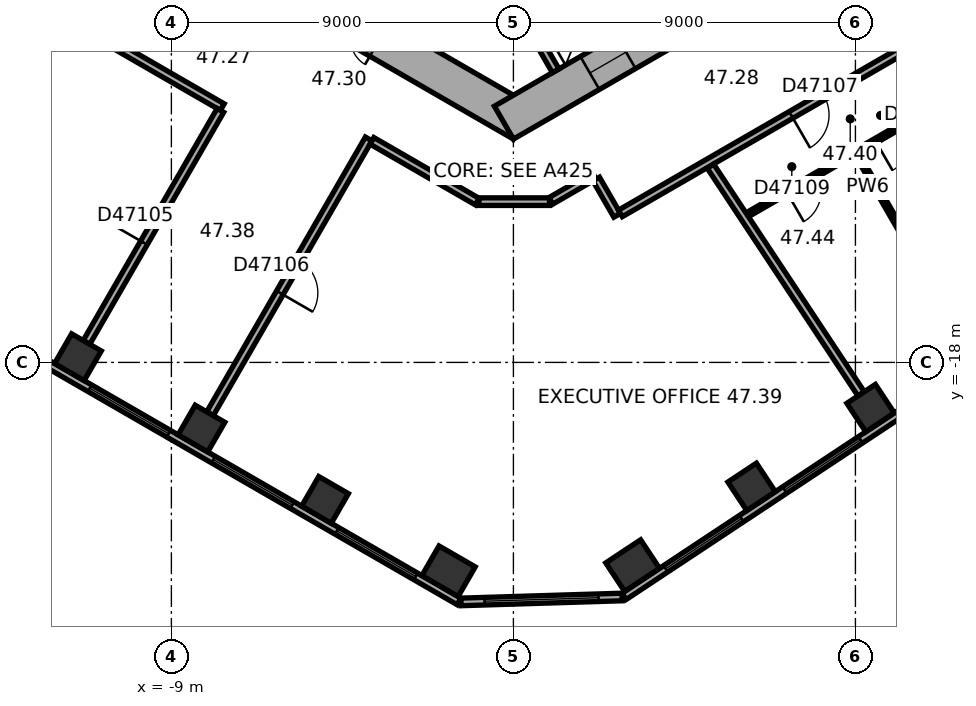
"""IFC4 building model, lengths in metres.
Left out: names, types, materials, properties, quantities, classifications, styles, units other than length and angle.
Written with IfcOpenShell. Run it as: python <this file> out.ifc"""

import sys

from ifc_helpers import new_model, si_unit, direction, frame, frame_2d, origin, origin_2d, place, context, subcontext, project, spatial, rectangle, extrude, element, fill, save


model = new_model("IFC4")
c1 = context("Model", 3, precision=1e-05, world=origin(), true_north=direction((0.0, 1.0)))
c2 = subcontext(c1, "Body", "Model", "MODEL_VIEW")
j1 = project(units=[si_unit("LENGTHUNIT", "METRE"), si_unit("PLANEANGLEUNIT", "RADIAN")], contexts=[c1])
p1 = place(None, origin())
s1 = spatial("IfcSite", under=j1, at=p1, CompositionType="ELEMENT")
p2 = place(p1, origin())
s2 = spatial("IfcBuilding", under=s1, at=p2, CompositionType="ELEMENT")
p3 = place(p2, frame((0.0, 0.0, 191.0)))
s3 = spatial("IfcBuildingStorey", under=s2, at=p3, CompositionType="ELEMENT", Elevation=191.0)
for number, where, z_axis, x_axis in (
    (1, (-11.46, -17.863, 0.0), (0.0, 0.0, 1.0), (0.866, -0.5, 0.0)),
    (2, (-8.208, -19.74, 0.0), (0.0, 0.0, 1.0), (0.866, -0.5, 0.0)),
    (3, (-4.958, -21.617, 0.0), (0.0, 0.0, 1.0), (0.866, -0.5, 0.0)),
):
    element("IfcColumn", number, at=place(p3, frame(where, z_axis=z_axis, x_axis=x_axis)), inside=s3, PredefinedType="COLUMN", context=c2, shape_type="SweptSolid", body=[
        extrude(rectangle(XDim=0.9, YDim=0.9, at=origin_2d()), origin(), (0.0, 0.0, 1.0), 3.7),
    ])
for number, where, z_axis, x_axis in (
    (4, (-1.706, -23.494, 0.0), (0.0, 0.0, 1.0), (0.866, -0.5, 0.0)),
    (5, (3.137, -23.346, 0.0), (0.0, 0.0, 1.0), (0.834, 0.552, 0.0)),
):
    element("IfcColumn", number, at=place(p3, frame(where, z_axis=z_axis, x_axis=x_axis)), inside=s3, PredefinedType="COLUMN", context=c2, shape_type="SweptSolid", body=[
        extrude(rectangle(XDim=1.1, YDim=0.9, at=origin_2d()), origin(), (0.0, 0.0, 1.0), 3.7),
    ])
for number, where, z_axis, x_axis in (
    (6, (6.268, -21.274, 0.0), (0.0, 0.0, 1.0), (0.834, 0.552, 0.0)),
    (7, (9.398, -19.202, 0.0), (0.0, 0.0, 1.0), (0.834, 0.552, 0.0)),
):
    element("IfcColumn", number, at=place(p3, frame(where, z_axis=z_axis, x_axis=x_axis)), inside=s3, PredefinedType="COLUMN", context=c2, shape_type="SweptSolid", body=[
        extrude(rectangle(XDim=0.9, YDim=0.9, at=origin_2d()), origin(), (0.0, 0.0, 1.0), 3.7),
    ])
p4 = place(p3, frame((-10.25, -5.629, 0.0), z_axis=(0.0, 0.0, 1.0), x_axis=(0.866022616891, -0.50000482701, 0.0)))
e8 = element("IfcWall", 8, at=p4, inside=s3, PredefinedType="SHEAR", context=c2, shape_type="SweptSolid", body=[
    extrude(rectangle(XDim=12.125, YDim=1.0, at=frame_2d((6.062, 0.0))), origin(), (0.0, 0.0, 1.0), 3.7),
])
p5 = place(p4, frame((6.262, 0.0, 0.0)))
e9 = element("IfcOpeningElement", 9, at=p5, cuts=e8, PredefinedType="OPENING", context=c2, shape_type="SweptSolid", body=[
    extrude(rectangle(XDim=1.5, YDim=2.1, at=frame_2d((0.75, 1.05))), frame((0.0, 0.51, 0.0), z_axis=(0.0, -1.0, 0.0), x_axis=(1.0, 0.0, 0.0)), (0.0, 0.0, 1.0), 1.02),
])
p6 = place(p4, frame((1.712, 0.0, 0.0)))
e10 = element("IfcOpeningElement", 10, at=p6, cuts=e8, PredefinedType="OPENING", context=c2, shape_type="SweptSolid", body=[
    extrude(rectangle(XDim=1.1, YDim=2.1, at=frame_2d((0.55, 1.05))), frame((0.0, 0.51, 0.0), z_axis=(0.0, -1.0, 0.0), x_axis=(1.0, 0.0, 0.0)), (0.0, 0.0, 1.0), 1.02),
])
p7 = place(p4, frame((4.312, 0.0, 0.0)))
e11 = element("IfcOpeningElement", 11, at=p7, cuts=e8, PredefinedType="OPENING", context=c2, shape_type="SweptSolid", body=[
    extrude(rectangle(XDim=1.1, YDim=2.1, at=frame_2d((0.55, 1.05))), frame((0.0, 0.51, 0.0), z_axis=(0.0, -1.0, 0.0), x_axis=(1.0, 0.0, 0.0)), (0.0, 0.0, 1.0), 1.02),
])
p8 = place(p3, frame((-0.25, -11.691, 0.0), z_axis=(0.0, 0.0, 1.0), x_axis=(0.866022616891, 0.50000482701, 0.0)))
e12 = element("IfcWall", 12, at=p8, inside=s3, PredefinedType="SHEAR", context=c2, shape_type="SweptSolid", body=[
    extrude(rectangle(XDim=12.125, YDim=1.0, at=frame_2d((6.062, 0.0))), origin(), (0.0, 0.0, 1.0), 3.7),
])
p9 = place(p8, frame((2.612, 0.0, 0.0)))
e13 = element("IfcOpeningElement", 13, at=p9, cuts=e12, PredefinedType="OPENING", context=c2, shape_type="SweptSolid", body=[
    extrude(rectangle(XDim=1.1, YDim=2.1, at=frame_2d((0.55, 1.05))), frame((0.0, 0.51, 0.0), z_axis=(0.0, -1.0, 0.0), x_axis=(1.0, 0.0, 0.0)), (0.0, 0.0, 1.0), 1.02),
])
p10 = place(p8, frame((5.212, 0.0, 0.0)))
e14 = element("IfcOpeningElement", 14, at=p10, cuts=e12, PredefinedType="OPENING", context=c2, shape_type="SweptSolid", body=[
    extrude(rectangle(XDim=1.1, YDim=2.1, at=frame_2d((0.55, 1.05))), frame((0.0, 0.51, 0.0), z_axis=(0.0, -1.0, 0.0), x_axis=(1.0, 0.0, 0.0)), (0.0, 0.0, 1.0), 1.02),
])
p11 = place(p8, frame((7.812, 0.0, 0.0)))
e15 = element("IfcOpeningElement", 15, at=p11, cuts=e12, PredefinedType="OPENING", context=c2, shape_type="SweptSolid", body=[
    extrude(rectangle(XDim=1.1, YDim=2.1, at=frame_2d((0.55, 1.05))), frame((0.0, 0.51, 0.0), z_axis=(0.0, -1.0, 0.0), x_axis=(1.0, 0.0, 0.0)), (0.0, 0.0, 1.0), 1.02),
])
p12 = place(p3, frame((-18.789, -14.267, 0.0), z_axis=(0.0, 0.0, 1.0), x_axis=(0.866023315909, -0.500003616288, 0.0)))
e16 = element("IfcWall", 16, at=p12, inside=s3, PredefinedType="STANDARD", context=c2, shape_type="SweptSolid", body=[
    extrude(rectangle(XDim=20.044, YDim=0.2, at=frame_2d((10.022, 0.0))), origin(), (0.0, 0.0, 1.0), 3.7),
])
p13 = place(p12, frame((1.314, 0.0, 0.9)))
e17 = element("IfcOpeningElement", 17, at=p13, cuts=e16, PredefinedType="OPENING", context=c2, shape_type="SweptSolid", body=[
    extrude(rectangle(XDim=2.4, YDim=2.0, at=frame_2d((1.2, 1.0))), frame((0.0, 0.11, 0.0), z_axis=(0.0, -1.0, 0.0), x_axis=(1.0, 0.0, 0.0)), (0.0, 0.0, 1.0), 0.22),
])
p14 = place(p12, frame((5.069, 0.0, 0.9)))
e18 = element("IfcOpeningElement", 18, at=p14, cuts=e16, PredefinedType="OPENING", context=c2, shape_type="SweptSolid", body=[
    extrude(rectangle(XDim=2.4, YDim=2.0, at=frame_2d((1.2, 1.0))), frame((0.0, 0.11, 0.0), z_axis=(0.0, -1.0, 0.0), x_axis=(1.0, 0.0, 0.0)), (0.0, 0.0, 1.0), 0.22),
])
p15 = place(p12, frame((8.823, 0.0, 0.9)))
e19 = element("IfcOpeningElement", 19, at=p15, cuts=e16, PredefinedType="OPENING", context=c2, shape_type="SweptSolid", body=[
    extrude(rectangle(XDim=2.4, YDim=2.0, at=frame_2d((1.2, 1.0))), frame((0.0, 0.11, 0.0), z_axis=(0.0, -1.0, 0.0), x_axis=(1.0, 0.0, 0.0)), (0.0, 0.0, 1.0), 0.22),
])
p16 = place(p12, frame((12.577, 0.0, 0.9)))
e20 = element("IfcOpeningElement", 20, at=p16, cuts=e16, PredefinedType="OPENING", context=c2, shape_type="SweptSolid", body=[
    extrude(rectangle(XDim=2.4, YDim=2.0, at=frame_2d((1.2, 1.0))), frame((0.0, 0.11, 0.0), z_axis=(0.0, -1.0, 0.0), x_axis=(1.0, 0.0, 0.0)), (0.0, 0.0, 1.0), 0.22),
])
p17 = place(p12, frame((16.331, 0.0, 0.9)))
e21 = element("IfcOpeningElement", 21, at=p17, cuts=e16, PredefinedType="OPENING", context=c2, shape_type="SweptSolid", body=[
    extrude(rectangle(XDim=2.4, YDim=2.0, at=frame_2d((1.2, 1.0))), frame((0.0, 0.11, 0.0), z_axis=(0.0, -1.0, 0.0), x_axis=(1.0, 0.0, 0.0)), (0.0, 0.0, 1.0), 0.22),
])
p18 = place(p3, frame((-1.378, -24.302, 0.0), z_axis=(0.0, 0.0, 1.0), x_axis=(0.999533857267, 0.030529791629, 0.0)))
e22 = element("IfcWall", 22, at=p18, inside=s3, PredefinedType="STANDARD", context=c2, shape_type="SweptSolid", body=[
    extrude(rectangle(XDim=4.238, YDim=0.2, at=frame_2d((2.119, 0.0))), origin(), (0.0, 0.0, 1.0), 3.7),
])
p19 = place(p18, frame((0.619, 0.0, 0.9)))
e23 = element("IfcOpeningElement", 23, at=p19, cuts=e22, PredefinedType="OPENING", context=c2, shape_type="SweptSolid", body=[
    extrude(rectangle(XDim=3.0, YDim=2.0, at=frame_2d((1.5, 1.0))), frame((0.0, 0.11, 0.0), z_axis=(0.0, -1.0, 0.0), x_axis=(1.0, 0.0, 0.0)), (0.0, 0.0, 1.0), 0.22),
])
p20 = place(p3, frame((2.911, -24.156, 0.0), z_axis=(0.0, 0.0, 1.0), x_axis=(0.833882163564, 0.551942512668, 0.0)))
e24 = element("IfcWall", 24, at=p20, inside=s3, PredefinedType="STANDARD", context=c2, shape_type="SweptSolid", body=[
    extrude(rectangle(XDim=20.044, YDim=0.2, at=frame_2d((10.022, 0.0))), origin(), (0.0, 0.0, 1.0), 3.7),
])
p21 = place(p20, frame((1.313, 0.0, 0.9)))
e25 = element("IfcOpeningElement", 25, at=p21, cuts=e24, PredefinedType="OPENING", context=c2, shape_type="SweptSolid", body=[
    extrude(rectangle(XDim=2.4, YDim=2.0, at=frame_2d((1.2, 1.0))), frame((0.0, 0.11, 0.0), z_axis=(0.0, -1.0, 0.0), x_axis=(1.0, 0.0, 0.0)), (0.0, 0.0, 1.0), 0.22),
])
p22 = place(p20, frame((5.067, 0.0, 0.9)))
e26 = element("IfcOpeningElement", 26, at=p22, cuts=e24, PredefinedType="OPENING", context=c2, shape_type="SweptSolid", body=[
    extrude(rectangle(XDim=2.4, YDim=2.0, at=frame_2d((1.2, 1.0))), frame((0.0, 0.11, 0.0), z_axis=(0.0, -1.0, 0.0), x_axis=(1.0, 0.0, 0.0)), (0.0, 0.0, 1.0), 0.22),
])
p23 = place(p20, frame((8.821, 0.0, 0.9)))
e27 = element("IfcOpeningElement", 27, at=p23, cuts=e24, PredefinedType="OPENING", context=c2, shape_type="SweptSolid", body=[
    extrude(rectangle(XDim=2.4, YDim=2.0, at=frame_2d((1.2, 1.0))), frame((0.0, 0.11, 0.0), z_axis=(0.0, -1.0, 0.0), x_axis=(1.0, 0.0, 0.0)), (0.0, 0.0, 1.0), 0.22),
])
p24 = place(p20, frame((12.575, 0.0, 0.9)))
e28 = element("IfcOpeningElement", 28, at=p24, cuts=e24, PredefinedType="OPENING", context=c2, shape_type="SweptSolid", body=[
    extrude(rectangle(XDim=2.4, YDim=2.0, at=frame_2d((1.2, 1.0))), frame((0.0, 0.11, 0.0), z_axis=(0.0, -1.0, 0.0), x_axis=(1.0, 0.0, 0.0)), (0.0, 0.0, 1.0), 0.22),
])
p25 = place(p20, frame((16.329, 0.0, 0.9)))
e29 = element("IfcOpeningElement", 29, at=p25, cuts=e24, PredefinedType="OPENING", context=c2, shape_type="SweptSolid", body=[
    extrude(rectangle(XDim=2.4, YDim=2.0, at=frame_2d((1.2, 1.0))), frame((0.0, 0.11, 0.0), z_axis=(0.0, -1.0, 0.0), x_axis=(1.0, 0.0, 0.0)), (0.0, 0.0, 1.0), 0.22),
])
p26 = place(p3, frame((0.013, -8.422, 0.0), z_axis=(0.0, 0.0, 1.0), x_axis=(0.500077893725, -0.86598042715, 0.0)))
e30 = element("IfcWall", 30, at=p26, inside=s3, PredefinedType="PARTITIONING", context=c2, shape_type="SweptSolid", body=[
    extrude(rectangle(XDim=2.2, YDim=0.2, at=frame_2d((1.1, 0.0))), origin(), (0.0, 0.0, 1.0), 3.42),
])
p27 = place(p3, frame((-11.651, -8.978, 0.0), z_axis=(0.0, 0.0, 1.0), x_axis=(0.866010893236, -0.500025132165, 0.0)))
e31 = element("IfcWall", 31, at=p27, inside=s3, PredefinedType="PARTITIONING", context=c2, shape_type="SweptSolid", body=[
    extrude(rectangle(XDim=4.608, YDim=0.2, at=frame_2d((2.304, 0.0))), origin(), (0.0, 0.0, 1.0), 3.42),
])
p28 = place(p3, frame((-11.235, -17.474, 0.0), z_axis=(0.0, 0.0, 1.0), x_axis=(0.500009260695, 0.866020057054, 0.0)))
e32 = element("IfcWall", 32, at=p28, inside=s3, PredefinedType="PARTITIONING", context=c2, shape_type="SweptSolid", body=[
    extrude(rectangle(XDim=7.049, YDim=0.2, at=frame_2d((3.524, 0.0))), origin(), (0.0, 0.0, 1.0), 2.87),
])
p29 = place(p28, frame((3.024, 0.0, 0.0)))
e33 = element("IfcOpeningElement", 33, at=p29, cuts=e32, PredefinedType="OPENING", context=c2, shape_type="SweptSolid", body=[
    extrude(rectangle(XDim=1.0, YDim=2.1, at=frame_2d((0.5, 1.05))), frame((0.0, 0.11, 0.0), z_axis=(0.0, -1.0, 0.0), x_axis=(1.0, 0.0, 0.0)), (0.0, 0.0, 1.0), 0.22),
])
p30 = place(p3, frame((-7.984, -19.351, 0.0), z_axis=(0.0, 0.0, 1.0), x_axis=(0.500010139422, 0.866019549707, 0.0)))
e34 = element("IfcWall", 34, at=p30, inside=s3, PredefinedType="PARTITIONING", context=c2, shape_type="SweptSolid", body=[
    extrude(rectangle(XDim=8.35, YDim=0.2, at=frame_2d((4.175, 0.0))), origin(), (0.0, 0.0, 1.0), 3.42),
])
p31 = place(p30, frame((3.675, 0.0, 0.0)))
e35 = element("IfcOpeningElement", 35, at=p31, cuts=e34, PredefinedType="OPENING", context=c2, shape_type="SweptSolid", body=[
    extrude(rectangle(XDim=1.0, YDim=2.1, at=frame_2d((0.5, 1.05))), frame((0.0, 0.11, 0.0), z_axis=(0.0, -1.0, 0.0), x_axis=(1.0, 0.0, 0.0)), (0.0, 0.0, 1.0), 0.22),
])
p32 = place(p3, frame((-3.722, -12.169, 0.0), z_axis=(0.0, 0.0, 1.0), x_axis=(0.866033163891, -0.499986558861, 0.0)))
e36 = element("IfcWall", 36, at=p32, inside=s3, PredefinedType="PARTITIONING", context=c2, shape_type="SweptSolid", body=[
    extrude(rectangle(XDim=3.201, YDim=0.2, at=frame_2d((1.6, 0.0))), origin(), (0.0, 0.0, 1.0), 3.42),
])
p33 = place(p3, frame((-0.91, -13.77, 0.0), z_axis=(0.0, 0.0, 1.0), x_axis=(1.0, 0.0, 0.0)))
e37 = element("IfcWall", 37, at=p33, inside=s3, PredefinedType="PARTITIONING", context=c2, shape_type="SweptSolid", body=[
    extrude(rectangle(XDim=1.86, YDim=0.2, at=frame_2d((0.93, 0.0))), origin(), (0.0, 0.0, 1.0), 3.42),
])
p34 = place(p3, frame((0.985, -13.75, 0.0), z_axis=(0.0, 0.0, 1.0), x_axis=(0.866028661061, 0.499994358189, 0.0)))
e38 = element("IfcWall", 38, at=p34, inside=s3, PredefinedType="PARTITIONING", context=c2, shape_type="SweptSolid", body=[
    extrude(rectangle(XDim=1.321, YDim=0.2, at=frame_2d((0.661, 0.0))), origin(), (0.0, 0.0, 1.0), 3.42),
])
p35 = place(p3, frame((2.179, -13.176, 0.0), z_axis=(0.0, 0.0, 1.0), x_axis=(0.499978356969, -0.866037899034, 0.0)))
e39 = element("IfcWall", 39, at=p35, inside=s3, PredefinedType="PARTITIONING", context=c2, shape_type="SweptSolid", body=[
    extrude(rectangle(XDim=1.101, YDim=0.2, at=frame_2d((0.551, 0.0))), origin(), (0.0, 0.0, 1.0), 3.42),
])
p36 = place(p3, frame((2.816, -14.079, 0.0), z_axis=(0.0, 0.0, 1.0), x_axis=(0.866021128829, 0.500007404367, 0.0)))
e40 = element("IfcWall", 40, at=p36, inside=s3, PredefinedType="PARTITIONING", context=c2, shape_type="SweptSolid", body=[
    extrude(rectangle(XDim=8.702, YDim=0.2, at=frame_2d((4.351, 0.0))), origin(), (0.0, 0.0, 1.0), 3.42),
])
p37 = place(p36, frame((5.184, 0.0, 0.0)))
e41 = element("IfcOpeningElement", 41, at=p37, cuts=e40, PredefinedType="OPENING", context=c2, shape_type="SweptSolid", body=[
    extrude(rectangle(XDim=1.0, YDim=2.1, at=frame_2d((0.5, 1.05))), frame((0.0, 0.11, 0.0), z_axis=(0.0, -1.0, 0.0), x_axis=(1.0, 0.0, 0.0)), (0.0, 0.0, 1.0), 0.22),
])
p38 = place(p3, frame((6.152, -14.116, 0.0), z_axis=(0.0, 0.0, 1.0), x_axis=(0.866026788224, 0.499997602072, 0.0)))
e42 = element("IfcWall", 42, at=p38, inside=s3, PredefinedType="PARTITIONING", context=c2, shape_type="SweptSolid", body=[
    extrude(rectangle(XDim=7.322, YDim=0.12, at=frame_2d((3.661, 0.0))), origin(), (0.0, 0.0, 1.0), 3.42),
])
p39 = place(p38, frame((5.858, 0.0, 0.0)))
e43 = element("IfcOpeningElement", 43, at=p39, cuts=e42, PredefinedType="OPENING", context=c2, shape_type="SweptSolid", body=[
    extrude(rectangle(XDim=1.0, YDim=2.1, at=frame_2d((0.5, 1.05))), frame((0.0, 0.07, 0.0), z_axis=(0.0, -1.0, 0.0), x_axis=(1.0, 0.0, 0.0)), (0.0, 0.0, 1.0), 0.14),
])
p40 = place(p38, frame((1.2, 0.0, 0.0)))
e44 = element("IfcOpeningElement", 44, at=p40, cuts=e42, PredefinedType="OPENING", context=c2, shape_type="SweptSolid", body=[
    extrude(rectangle(XDim=0.9, YDim=2.1, at=frame_2d((0.45, 1.05))), frame((0.0, 0.07, 0.0), z_axis=(0.0, -1.0, 0.0), x_axis=(1.0, 0.0, 0.0)), (0.0, 0.0, 1.0), 0.14),
])
p41 = place(p38, frame((3.897, 0.0, 0.0)))
e45 = element("IfcOpeningElement", 45, at=p41, cuts=e42, PredefinedType="OPENING", context=c2, shape_type="SweptSolid", body=[
    extrude(rectangle(XDim=0.9, YDim=2.1, at=frame_2d((0.45, 1.05))), frame((0.0, 0.07, 0.0), z_axis=(0.0, -1.0, 0.0), x_axis=(1.0, 0.0, 0.0)), (0.0, 0.0, 1.0), 0.14),
])
p42 = place(p3, frame((9.15, -18.827, 0.0), z_axis=(0.0, 0.0, 1.0), x_axis=(-0.551928083938, 0.83389171369, 0.0)))
e46 = element("IfcWall", 46, at=p42, inside=s3, PredefinedType="PARTITIONING", context=c2, shape_type="SweptSolid", body=[
    extrude(rectangle(XDim=7.182, YDim=0.2, at=frame_2d((3.591, 0.0))), origin(), (0.0, 0.0, 1.0), 2.87),
])
p43 = place(p3, frame((11.705, -17.136, 0.0), z_axis=(0.0, 0.0, 1.0), x_axis=(-0.499985382219, 0.8660338432, 0.0)))
e47 = element("IfcWall", 47, at=p43, inside=s3, PredefinedType="PARTITIONING", context=c2, shape_type="SweptSolid", body=[
    extrude(rectangle(XDim=5.332, YDim=0.12, at=frame_2d((2.666, 0.0))), origin(), (0.0, 0.0, 1.0), 3.42),
])
p44 = place(p15, origin())
e48 = element("IfcWindow", 48, at=p44, inside=s3, PartitioningType="SINGLE_PANEL", PredefinedType="WINDOW", context=c2, shape_type="SweptSolid", body=[
    extrude(rectangle(XDim=2.4, YDim=2.0, at=frame_2d((1.2, 1.0))), frame((0.0, 0.03, 0.0), z_axis=(0.0, -1.0, 0.0), x_axis=(1.0, 0.0, 0.0)), (0.0, 0.0, 1.0), 0.06),
])
fill(e19, e48)
p45 = place(p16, origin())
e49 = element("IfcWindow", 49, at=p45, inside=s3, PartitioningType="SINGLE_PANEL", PredefinedType="WINDOW", context=c2, shape_type="SweptSolid", body=[
    extrude(rectangle(XDim=2.4, YDim=2.0, at=frame_2d((1.2, 1.0))), frame((0.0, 0.03, 0.0), z_axis=(0.0, -1.0, 0.0), x_axis=(1.0, 0.0, 0.0)), (0.0, 0.0, 1.0), 0.06),
])
fill(e20, e49)
p46 = place(p17, origin())
e50 = element("IfcWindow", 50, at=p46, inside=s3, PartitioningType="SINGLE_PANEL", PredefinedType="WINDOW", context=c2, shape_type="SweptSolid", body=[
    extrude(rectangle(XDim=2.4, YDim=2.0, at=frame_2d((1.2, 1.0))), frame((0.0, 0.03, 0.0), z_axis=(0.0, -1.0, 0.0), x_axis=(1.0, 0.0, 0.0)), (0.0, 0.0, 1.0), 0.06),
])
fill(e21, e50)
p47 = place(p19, origin())
e51 = element("IfcWindow", 51, at=p47, inside=s3, PartitioningType="SINGLE_PANEL", PredefinedType="WINDOW", context=c2, shape_type="SweptSolid", body=[
    extrude(rectangle(XDim=3.0, YDim=2.0, at=frame_2d((1.5, 1.0))), frame((0.0, 0.03, 0.0), z_axis=(0.0, -1.0, 0.0), x_axis=(1.0, 0.0, 0.0)), (0.0, 0.0, 1.0), 0.06),
])
fill(e23, e51)
p48 = place(p21, origin())
e52 = element("IfcWindow", 52, at=p48, inside=s3, PartitioningType="SINGLE_PANEL", PredefinedType="WINDOW", context=c2, shape_type="SweptSolid", body=[
    extrude(rectangle(XDim=2.4, YDim=2.0, at=frame_2d((1.2, 1.0))), frame((0.0, 0.03, 0.0), z_axis=(0.0, -1.0, 0.0), x_axis=(1.0, 0.0, 0.0)), (0.0, 0.0, 1.0), 0.06),
])
fill(e25, e52)
p49 = place(p22, origin())
e53 = element("IfcWindow", 53, at=p49, inside=s3, PartitioningType="SINGLE_PANEL", PredefinedType="WINDOW", context=c2, shape_type="SweptSolid", body=[
    extrude(rectangle(XDim=2.4, YDim=2.0, at=frame_2d((1.2, 1.0))), frame((0.0, 0.03, 0.0), z_axis=(0.0, -1.0, 0.0), x_axis=(1.0, 0.0, 0.0)), (0.0, 0.0, 1.0), 0.06),
])
fill(e26, e53)
p50 = place(p9, origin())
e54 = element("IfcDoor", 54, at=p50, inside=s3, OperationType="DOUBLE_DOOR_SLIDING", PredefinedType="DOOR", context=c2, shape_type="SweptSolid", body=[
    extrude(rectangle(XDim=1.1, YDim=2.1, at=frame_2d((0.55, 1.05))), frame((0.0, 0.025, 0.0), z_axis=(0.0, -1.0, 0.0), x_axis=(1.0, 0.0, 0.0)), (0.0, 0.0, 1.0), 0.05),
])
fill(e13, e54)
p51 = place(p29, origin())
e55 = element("IfcDoor", 55, at=p51, inside=s3, OperationType="SINGLE_SWING_LEFT", PredefinedType="DOOR", context=c2, shape_type="SweptSolid", body=[
    extrude(rectangle(XDim=1.0, YDim=2.1, at=frame_2d((0.5, 1.05))), frame((0.0, 0.025, 0.0), z_axis=(0.0, -1.0, 0.0), x_axis=(1.0, 0.0, 0.0)), (0.0, 0.0, 1.0), 0.05),
])
fill(e33, e55)
p52 = place(p31, origin())
e56 = element("IfcDoor", 56, at=p52, inside=s3, OperationType="SINGLE_SWING_LEFT", PredefinedType="DOOR", context=c2, shape_type="SweptSolid", body=[
    extrude(rectangle(XDim=1.0, YDim=2.1, at=frame_2d((0.5, 1.05))), frame((0.0, 0.025, 0.0), z_axis=(0.0, -1.0, 0.0), x_axis=(1.0, 0.0, 0.0)), (0.0, 0.0, 1.0), 0.05),
])
fill(e35, e56)
p53 = place(p37, origin())
e57 = element("IfcDoor", 57, at=p53, inside=s3, OperationType="SINGLE_SWING_LEFT", PredefinedType="DOOR", context=c2, shape_type="SweptSolid", body=[
    extrude(rectangle(XDim=1.0, YDim=2.1, at=frame_2d((0.5, 1.05))), frame((0.0, 0.025, 0.0), z_axis=(0.0, -1.0, 0.0), x_axis=(1.0, 0.0, 0.0)), (0.0, 0.0, 1.0), 0.05),
])
fill(e41, e57)
p54 = place(p40, origin())
e58 = element("IfcDoor", 58, at=p54, inside=s3, OperationType="SINGLE_SWING_LEFT", PredefinedType="DOOR", context=c2, shape_type="SweptSolid", body=[
    extrude(rectangle(XDim=0.9, YDim=2.1, at=frame_2d((0.45, 1.05))), frame((0.0, 0.025, 0.0), z_axis=(0.0, -1.0, 0.0), x_axis=(1.0, 0.0, 0.0)), (0.0, 0.0, 1.0), 0.05),
])
fill(e44, e58)
p55 = place(p41, origin())
e59 = element("IfcDoor", 59, at=p55, inside=s3, OperationType="SINGLE_SWING_LEFT", PredefinedType="DOOR", context=c2, shape_type="SweptSolid", body=[
    extrude(rectangle(XDim=0.9, YDim=2.1, at=frame_2d((0.45, 1.05))), frame((0.0, 0.025, 0.0), z_axis=(0.0, -1.0, 0.0), x_axis=(1.0, 0.0, 0.0)), (0.0, 0.0, 1.0), 0.05),
])
fill(e45, e59)
save(model, sys.argv[1])
